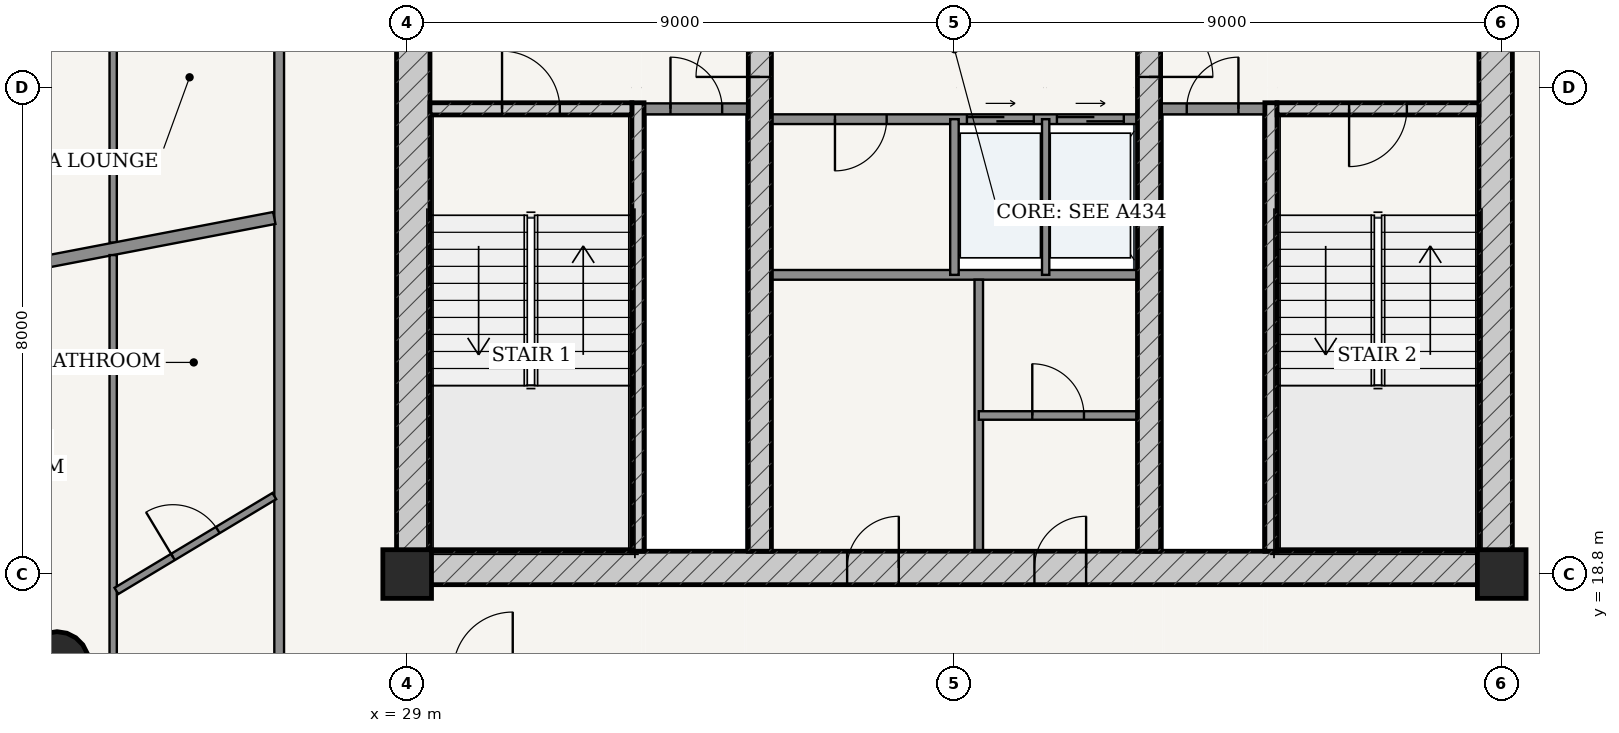
"""IFC4 building model, lengths in metres.
Left out: names, types, materials, properties, quantities, classifications, styles, units other than length and angle.
Written with IfcOpenShell. Run it as: python <this file> out.ifc"""

import sys

from ifc_helpers import new_model, si_unit, direction, frame, frame_2d, origin, origin_2d, place, context, subcontext, project, spatial, rectangle, hollow_circle, extrude, source, transform, mapped, element, fill, save


model = new_model("IFC4")
c1 = context("Model", 3, precision=1e-05, world=origin(), true_north=direction((-0.2419218956, 0.970295726276)))
c2 = subcontext(c1, "Body", "Model", "MODEL_VIEW")
j1 = project(units=[si_unit("LENGTHUNIT", "METRE"), si_unit("PLANEANGLEUNIT", "RADIAN")], contexts=[c1])
p1 = place(None, origin())
s1 = spatial("IfcSite", under=j1, at=p1, CompositionType="ELEMENT")
p2 = place(p1, origin())
s2 = spatial("IfcBuilding", under=s1, at=p2, CompositionType="ELEMENT")
p3 = place(p2, frame((0.0, 0.0, 255.7)))
s3 = spatial("IfcBuildingStorey", under=s2, at=p3, CompositionType="ELEMENT", Elevation=255.7)
for number, where, z_axis, x_axis in (
    (1, (29.0, 18.8, 0.0), (0.0, 0.0, 1.0), (1.0, 0.0, 0.0)),
    (2, (47.0, 18.8, 0.0), (0.0, 0.0, 1.0), (1.0, 0.0, 0.0)),
):
    element("IfcColumn", number, at=place(p3, frame(where, z_axis=z_axis, x_axis=x_axis)), inside=s3, PredefinedType="COLUMN", context=c2, shape_type="SweptSolid", body=[
        extrude(rectangle(XDim=0.8, YDim=0.8, at=origin_2d()), origin(), (0.0, 0.0, 1.0), 3.75),
    ])
p4 = place(p3, frame((28.825, 18.9, 0.0), z_axis=(0.0, 0.0, 1.0), x_axis=(1.0, 0.0, 0.0)))
e3 = element("IfcWall", 3, at=p4, inside=s3, PredefinedType="SHEAR", context=c2, shape_type="SweptSolid", body=[
    extrude(rectangle(XDim=18.35, YDim=0.55, at=frame_2d((9.175, 0.0))), origin(), (0.0, 0.0, 1.0), 3.49),
])
p5 = place(p4, frame((7.41, 0.0, 0.0)))
e4 = element("IfcOpeningElement", 4, at=p5, cuts=e3, PredefinedType="OPENING", context=c2, shape_type="SweptSolid", body=[
    extrude(rectangle(XDim=0.85, YDim=2.1, at=frame_2d((0.425, 1.05))), frame((0.0, 0.285, 0.0), z_axis=(0.0, -1.0, 0.0), x_axis=(1.0, 0.0, 0.0)), (0.0, 0.0, 1.0), 0.57),
])
p6 = place(p4, frame((10.49, 0.0, 0.0)))
e5 = element("IfcOpeningElement", 5, at=p6, cuts=e3, PredefinedType="OPENING", context=c2, shape_type="SweptSolid", body=[
    extrude(rectangle(XDim=0.85, YDim=2.1, at=frame_2d((0.425, 1.05))), frame((0.0, 0.285, 0.0), z_axis=(0.0, -1.0, 0.0), x_axis=(1.0, 0.0, 0.0)), (0.0, 0.0, 1.0), 0.57),
])
p7 = place(p3, frame((29.1, 19.175, 0.0), z_axis=(0.0, 0.0, 1.0), x_axis=(0.0, 1.0, 0.0)))
e6 = element("IfcWall", 6, at=p7, inside=s3, PredefinedType="SHEAR", context=c2, shape_type="SweptSolid", body=[
    extrude(rectangle(XDim=15.25, YDim=0.55, at=frame_2d((7.625, 0.0))), origin(), (0.0, 0.0, 1.0), 3.49),
])
p8 = place(p7, frame((9.875, 0.0, 0.0)))
e7 = element("IfcOpeningElement", 7, at=p8, cuts=e6, PredefinedType="OPENING", context=c2, shape_type="SweptSolid", body=[
    extrude(rectangle(XDim=1.5, YDim=2.2, at=frame_2d((0.75, 1.1))), frame((0.0, 0.285, 0.0), z_axis=(0.0, -1.0, 0.0), x_axis=(1.0, 0.0, 0.0)), (0.0, 0.0, 1.0), 0.57),
])
p9 = place(p3, frame((46.9, 19.175, 0.0), z_axis=(0.0, 0.0, 1.0), x_axis=(0.0, 1.0, 0.0)))
e8 = element("IfcWall", 8, at=p9, inside=s3, PredefinedType="SHEAR", context=c2, shape_type="SweptSolid", body=[
    extrude(rectangle(XDim=15.25, YDim=0.55, at=frame_2d((7.625, 0.0))), origin(), (0.0, 0.0, 1.0), 3.49),
])
p10 = place(p9, frame((9.875, 0.0, 0.0)))
e9 = element("IfcOpeningElement", 9, at=p10, cuts=e8, PredefinedType="OPENING", context=c2, shape_type="SweptSolid", body=[
    extrude(rectangle(XDim=1.5, YDim=2.2, at=frame_2d((0.75, 1.1))), frame((0.0, 0.285, 0.0), z_axis=(0.0, -1.0, 0.0), x_axis=(1.0, 0.0, 0.0)), (0.0, 0.0, 1.0), 0.57),
])
p11 = place(p3, frame((32.795, 19.175, 0.0), z_axis=(0.0, 0.0, 1.0), x_axis=(0.0, 1.0, 0.0)))
e10 = element("IfcWall", 10, at=p11, inside=s3, PredefinedType="SOLIDWALL", context=c2, shape_type="SweptSolid", body=[
    extrude(rectangle(XDim=7.375, YDim=0.2, at=frame_2d((3.688, 0.0))), origin(), (0.0, 0.0, 1.0), 3.49),
])
p12 = place(p3, frame((29.375, 26.45, 0.0), z_axis=(0.0, 0.0, 1.0), x_axis=(1.0, 0.0, 0.0)))
e11 = element("IfcWall", 11, at=p12, inside=s3, PredefinedType="SOLIDWALL", context=c2, shape_type="SweptSolid", body=[
    extrude(rectangle(XDim=3.32, YDim=0.2, at=frame_2d((1.66, 0.0))), origin(), (0.0, 0.0, 1.0), 3.49),
])
p13 = place(p12, frame((1.185, 0.0, 0.0)))
e12 = element("IfcOpeningElement", 12, at=p13, cuts=e11, PredefinedType="OPENING", context=c2, shape_type="SweptSolid", body=[
    extrude(rectangle(XDim=0.95, YDim=2.15, at=frame_2d((0.475, 1.075))), frame((0.0, 0.11, 0.0), z_axis=(0.0, -1.0, 0.0), x_axis=(1.0, 0.0, 0.0)), (0.0, 0.0, 1.0), 0.22),
])
p14 = place(p3, frame((43.205, 19.175, 0.0), z_axis=(0.0, 0.0, 1.0), x_axis=(0.0, 1.0, 0.0)))
e13 = element("IfcWall", 13, at=p14, inside=s3, PredefinedType="SOLIDWALL", context=c2, shape_type="SweptSolid", body=[
    extrude(rectangle(XDim=7.375, YDim=0.2, at=frame_2d((3.688, 0.0))), origin(), (0.0, 0.0, 1.0), 3.49),
])
p15 = place(p3, frame((43.305, 26.45, 0.0), z_axis=(0.0, 0.0, 1.0), x_axis=(1.0, 0.0, 0.0)))
e14 = element("IfcWall", 14, at=p15, inside=s3, PredefinedType="SOLIDWALL", context=c2, shape_type="SweptSolid", body=[
    extrude(rectangle(XDim=3.32, YDim=0.2, at=frame_2d((1.66, 0.0))), origin(), (0.0, 0.0, 1.0), 3.49),
])
p16 = place(p15, frame((1.185, 0.0, 0.0)))
e15 = element("IfcOpeningElement", 15, at=p16, cuts=e14, PredefinedType="OPENING", context=c2, shape_type="SweptSolid", body=[
    extrude(rectangle(XDim=0.95, YDim=2.15, at=frame_2d((0.475, 1.075))), frame((0.0, 0.11, 0.0), z_axis=(0.0, -1.0, 0.0), x_axis=(1.0, 0.0, 0.0)), (0.0, 0.0, 1.0), 0.22),
])
p17 = place(p3, frame((34.8, 19.175, 0.0), z_axis=(0.0, 0.0, 1.0), x_axis=(0.0, 1.0, 0.0)))
e16 = element("IfcWall", 16, at=p17, inside=s3, PredefinedType="SHEAR", context=c2, shape_type="SweptSolid", body=[
    extrude(rectangle(XDim=15.25, YDim=0.38, at=frame_2d((7.625, 0.0))), origin(), (0.0, 0.0, 1.0), 3.49),
])
p18 = place(p17, frame((7.8, 0.0, 0.0)))
e17 = element("IfcOpeningElement", 17, at=p18, cuts=e16, PredefinedType="OPENING", context=c2, shape_type="SweptSolid", body=[
    extrude(rectangle(XDim=1.05, YDim=2.15, at=frame_2d((0.525, 1.075))), frame((0.0, 0.2, 0.0), z_axis=(0.0, -1.0, 0.0), x_axis=(1.0, 0.0, 0.0)), (0.0, 0.0, 1.0), 0.4),
])
p19 = place(p3, frame((41.2, 19.175, 0.0), z_axis=(0.0, 0.0, 1.0), x_axis=(0.0, 1.0, 0.0)))
e18 = element("IfcWall", 18, at=p19, inside=s3, PredefinedType="SHEAR", context=c2, shape_type="SweptSolid", body=[
    extrude(rectangle(XDim=15.25, YDim=0.38, at=frame_2d((7.625, 0.0))), origin(), (0.0, 0.0, 1.0), 3.49),
])
p20 = place(p19, frame((7.8, 0.0, 0.0)))
e19 = element("IfcOpeningElement", 19, at=p20, cuts=e18, PredefinedType="OPENING", context=c2, shape_type="SweptSolid", body=[
    extrude(rectangle(XDim=1.05, YDim=2.15, at=frame_2d((0.525, 1.075))), frame((0.0, 0.2, 0.0), z_axis=(0.0, -1.0, 0.0), x_axis=(1.0, 0.0, 0.0)), (0.0, 0.0, 1.0), 0.4),
])
p21 = place(p3, frame((23.241, 17.328, 0.0), z_axis=(0.0, 0.0, 1.0), x_axis=(1.0, 0.0, 0.0)))
e20 = element("IfcColumn", 20, at=p21, inside=s3, PredefinedType="COLUMN", context=c2, shape_type="SweptSolid", body=[
    extrude(hollow_circle(Radius=0.525, WallThickness=0.035, at=origin_2d()), origin(), (0.0, 0.0, 1.0), 3.75),
])
p22 = place(p3, frame((32.9, 26.45, 0.0), z_axis=(0.0, 0.0, 1.0), x_axis=(1.0, 0.0, 0.0)))
e21 = element("IfcWall", 21, at=p22, inside=s3, PredefinedType="PARTITIONING", context=c2, shape_type="SweptSolid", body=[
    extrude(rectangle(XDim=1.71, YDim=0.18, at=frame_2d((0.855, 0.0))), origin(), (0.0, 0.0, 1.0), 3.49),
])
p23 = place(p22, frame((0.43, 0.0, 0.0)))
e22 = element("IfcOpeningElement", 22, at=p23, cuts=e21, PredefinedType="OPENING", context=c2, shape_type="SweptSolid", body=[
    extrude(rectangle(XDim=0.85, YDim=2.1, at=frame_2d((0.425, 1.05))), frame((0.0, 0.1, 0.0), z_axis=(0.0, -1.0, 0.0), x_axis=(1.0, 0.0, 0.0)), (0.0, 0.0, 1.0), 0.2),
])
p24 = place(p3, frame((41.39, 26.45, 0.0), z_axis=(0.0, 0.0, 1.0), x_axis=(1.0, 0.0, 0.0)))
e23 = element("IfcWall", 23, at=p24, inside=s3, PredefinedType="PARTITIONING", context=c2, shape_type="SweptSolid", body=[
    extrude(rectangle(XDim=1.71, YDim=0.18, at=frame_2d((0.855, 0.0))), origin(), (0.0, 0.0, 1.0), 3.49),
])
p25 = place(p24, frame((0.43, 0.0, 0.0)))
e24 = element("IfcOpeningElement", 24, at=p25, cuts=e23, PredefinedType="OPENING", context=c2, shape_type="SweptSolid", body=[
    extrude(rectangle(XDim=0.85, YDim=2.1, at=frame_2d((0.425, 1.05))), frame((0.0, 0.1, 0.0), z_axis=(0.0, -1.0, 0.0), x_axis=(1.0, 0.0, 0.0)), (0.0, 0.0, 1.0), 0.2),
])
p26 = place(p3, frame((34.99, 26.28, 0.0), z_axis=(0.0, 0.0, 1.0), x_axis=(1.0, 0.0, 0.0)))
e25 = element("IfcWall", 25, at=p26, inside=s3, PredefinedType="PARTITIONING", context=c2, shape_type="SweptSolid", body=[
    extrude(rectangle(XDim=6.02, YDim=0.16, at=frame_2d((3.01, 0.0))), origin(), (0.0, 0.0, 1.0), 3.49),
])
p27 = place(p26, frame((1.045, 0.0, 0.0)))
e26 = element("IfcOpeningElement", 26, at=p27, cuts=e25, PredefinedType="OPENING", context=c2, shape_type="SweptSolid", body=[
    extrude(rectangle(XDim=0.85, YDim=2.1, at=frame_2d((0.425, 1.05))), frame((0.0, 0.09, 0.0), z_axis=(0.0, -1.0, 0.0), x_axis=(1.0, 0.0, 0.0)), (0.0, 0.0, 1.0), 0.18),
])
p28 = place(p26, frame((3.215, 0.0, 0.0)))
e27 = element("IfcOpeningElement", 27, at=p28, cuts=e25, PredefinedType="OPENING", context=c2, shape_type="SweptSolid", body=[
    extrude(rectangle(XDim=1.1, YDim=2.2, at=frame_2d((0.55, 1.1))), frame((0.0, 0.09, 0.0), z_axis=(0.0, -1.0, 0.0), x_axis=(1.0, 0.0, 0.0)), (0.0, 0.0, 1.0), 0.18),
])
p29 = place(p26, frame((4.695, 0.0, 0.0)))
e28 = element("IfcOpeningElement", 28, at=p29, cuts=e25, PredefinedType="OPENING", context=c2, shape_type="SweptSolid", body=[
    extrude(rectangle(XDim=1.1, YDim=2.2, at=frame_2d((0.55, 1.1))), frame((0.0, 0.09, 0.0), z_axis=(0.0, -1.0, 0.0), x_axis=(1.0, 0.0, 0.0)), (0.0, 0.0, 1.0), 0.18),
])
p30 = place(p3, frame((34.99, 23.72, 0.0), z_axis=(0.0, 0.0, 1.0), x_axis=(1.0, 0.0, 0.0)))
e29 = element("IfcWall", 29, at=p30, inside=s3, PredefinedType="PARTITIONING", context=c2, shape_type="SweptSolid", body=[
    extrude(rectangle(XDim=6.02, YDim=0.16, at=frame_2d((3.01, 0.0))), origin(), (0.0, 0.0, 1.0), 3.49),
])
p31 = place(p3, frame((38.0, 23.72, 0.0), z_axis=(0.0, 0.0, 1.0), x_axis=(0.0, 1.0, 0.0)))
e30 = element("IfcWall", 30, at=p31, inside=s3, PredefinedType="PARTITIONING", context=c2, shape_type="SweptSolid", body=[
    extrude(rectangle(XDim=2.56, YDim=0.14, at=frame_2d((1.28, 0.0))), origin(), (0.0, 0.0, 1.0), 3.49),
])
p32 = place(p3, frame((39.5, 23.72, 0.0), z_axis=(0.0, 0.0, 1.0), x_axis=(0.0, 1.0, 0.0)))
e31 = element("IfcWall", 31, at=p32, inside=s3, PredefinedType="PARTITIONING", context=c2, shape_type="SweptSolid", body=[
    extrude(rectangle(XDim=2.56, YDim=0.12, at=frame_2d((1.28, 0.0))), origin(), (0.0, 0.0, 1.0), 3.49),
])
p33 = place(p3, frame((38.4, 19.175, 0.0), z_axis=(0.0, 0.0, 1.0), x_axis=(0.0, 1.0, 0.0)))
e32 = element("IfcWall", 32, at=p33, inside=s3, PredefinedType="PARTITIONING", context=c2, shape_type="SweptSolid", body=[
    extrude(rectangle(XDim=4.465, YDim=0.14, at=frame_2d((2.232, 0.0))), origin(), (0.0, 0.0, 1.0), 3.49),
])
p34 = place(p3, frame((38.4, 21.407, 0.0), z_axis=(0.0, 0.0, 1.0), x_axis=(1.0, 0.0, 0.0)))
e33 = element("IfcWall", 33, at=p34, inside=s3, PredefinedType="PARTITIONING", context=c2, shape_type="SweptSolid", body=[
    extrude(rectangle(XDim=2.61, YDim=0.14, at=frame_2d((1.305, 0.0))), origin(), (0.0, 0.0, 1.0), 3.49),
])
p35 = place(p34, frame((0.88, 0.0, 0.0)))
e34 = element("IfcOpeningElement", 34, at=p35, cuts=e33, PredefinedType="OPENING", context=c2, shape_type="SweptSolid", body=[
    extrude(rectangle(XDim=0.85, YDim=2.1, at=frame_2d((0.425, 1.05))), frame((0.0, 0.08, 0.0), z_axis=(0.0, -1.0, 0.0), x_axis=(1.0, 0.0, 0.0)), (0.0, 0.0, 1.0), 0.16),
])
p36 = place(p3, frame((26.895, 17.275, 0.0), z_axis=(0.0, 0.0, 1.0), x_axis=(0.0, 1.0, 0.0)))
e35 = element("IfcWall", 35, at=p36, inside=s3, PredefinedType="PARTITIONING", context=c2, shape_type="SweptSolid", body=[
    extrude(rectangle(XDim=13.925, YDim=0.16, at=frame_2d((6.962, 0.0))), origin(), (0.0, 0.0, 1.0), 3.015),
])
p37 = place(p3, frame((24.165, 24.249, 0.0), z_axis=(0.0, 0.0, 1.0), x_axis=(0.0, 1.0, 0.0)))
e36 = element("IfcWall", 36, at=p37, inside=s3, PredefinedType="PARTITIONING", context=c2, shape_type="SweptSolid", body=[
    extrude(rectangle(XDim=9.761, YDim=0.12, at=frame_2d((4.88, 0.0))), origin(), (0.0, 0.0, 1.0), 3.015),
])
p38 = place(p37, frame((4.43, 0.0, 0.0)))
e37 = element("IfcOpeningElement", 37, at=p38, cuts=e36, PredefinedType="OPENING", context=c2, shape_type="SweptSolid", body=[
    extrude(rectangle(XDim=0.9, YDim=2.15, at=frame_2d((0.45, 1.075))), frame((0.0, 0.07, 0.0), z_axis=(0.0, -1.0, 0.0), x_axis=(1.0, 0.0, 0.0)), (0.0, 0.0, 1.0), 0.14),
])
p39 = place(p3, frame((26.815, 24.656, 0.0), z_axis=(0.0, 0.0, 1.0), x_axis=(-0.982109889803, -0.188308694305, 0.0)))
e38 = element("IfcWall", 38, at=p39, inside=s3, PredefinedType="PARTITIONING", context=c2, shape_type="SweptSolid", body=[
    extrude(rectangle(XDim=7.884, YDim=0.2, at=frame_2d((3.942, 0.0))), origin(), (0.0, 0.0, 1.0), 3.015),
])
p40 = place(p3, frame((24.165, 14.465, 0.0), z_axis=(0.0, 0.0, 1.0), x_axis=(0.0, 1.0, 0.0)))
e39 = element("IfcWall", 39, at=p40, inside=s3, PredefinedType="PARTITIONING", context=c2, shape_type="SweptSolid", body=[
    extrude(rectangle(XDim=9.58, YDim=0.12, at=frame_2d((4.79, 0.0))), origin(), (0.0, 0.0, 1.0), 3.015),
])
p41 = place(p40, frame((0.879, 0.0, 0.0)))
e40 = element("IfcOpeningElement", 40, at=p41, cuts=e39, PredefinedType="OPENING", context=c2, shape_type="SweptSolid", body=[
    extrude(rectangle(XDim=0.9, YDim=2.15, at=frame_2d((0.45, 1.075))), frame((0.0, 0.07, 0.0), z_axis=(0.0, -1.0, 0.0), x_axis=(1.0, 0.0, 0.0)), (0.0, 0.0, 1.0), 0.14),
])
p42 = place(p3, frame((26.815, 20.082, 0.0), z_axis=(0.0, 0.0, 1.0), x_axis=(-0.857265264382, -0.514875000834, 0.0)))
e41 = element("IfcWall", 41, at=p42, inside=s3, PredefinedType="PARTITIONING", context=c2, shape_type="SweptSolid", body=[
    extrude(rectangle(XDim=3.029, YDim=0.12, at=frame_2d((1.515, 0.0))), origin(), (0.0, 0.0, 1.0), 3.209),
])
p43 = place(p42, frame((1.085, 0.0, 0.0)))
e42 = element("IfcOpeningElement", 42, at=p43, cuts=e41, PredefinedType="OPENING", context=c2, shape_type="SweptSolid", body=[
    extrude(rectangle(XDim=0.86, YDim=2.15, at=frame_2d((0.43, 1.075))), frame((0.0, 0.07, 0.0), z_axis=(0.0, -1.0, 0.0), x_axis=(1.0, 0.0, 0.0)), (0.0, 0.0, 1.0), 0.14),
])
m1 = source(origin(), c2, "Body", "SweptSolid", [
    extrude(rectangle(XDim=1.05, YDim=2.15, at=frame_2d((0.525, 1.075))), frame((0.0, 0.025, 0.0), z_axis=(0.0, -1.0, 0.0), x_axis=(1.0, 0.0, 0.0)), (0.0, 0.0, 1.0), 0.05),
])
p44 = place(p18, origin())
e43 = element("IfcDoor", 43, at=p44, inside=s3, OperationType="SINGLE_SWING_LEFT", PredefinedType="DOOR", context=c2, shape_type="MappedRepresentation", body=[
    mapped(m1, transform((0.0, 0.0, 0.0), scale=1.0)),
])
fill(e17, e43)
p45 = place(p20, frame((1.05, 0.0, 0.0), z_axis=(0.0, 0.0, 1.0), x_axis=(-1.0, 0.0, 0.0)))
e44 = element("IfcDoor", 44, at=p45, inside=s3, OperationType="SINGLE_SWING_RIGHT", PredefinedType="DOOR", context=c2, shape_type="MappedRepresentation", body=[
    mapped(m1, transform((0.0, 0.0, 0.0), scale=1.0)),
])
fill(e19, e44)
m2 = source(origin(), c2, "Body", "SweptSolid", [
    extrude(rectangle(XDim=0.95, YDim=2.15, at=frame_2d((0.475, 1.075))), frame((0.0, 0.025, 0.0), z_axis=(0.0, -1.0, 0.0), x_axis=(1.0, 0.0, 0.0)), (0.0, 0.0, 1.0), 0.05),
])
p46 = place(p13, origin())
e45 = element("IfcDoor", 45, at=p46, inside=s3, OperationType="SINGLE_SWING_LEFT", PredefinedType="DOOR", context=c2, shape_type="MappedRepresentation", body=[
    mapped(m2, transform((0.0, 0.0, 0.0), scale=1.0)),
])
fill(e12, e45)
p47 = place(p16, frame((0.95, 0.0, 0.0), z_axis=(0.0, 0.0, 1.0), x_axis=(-1.0, 0.0, 0.0)))
e46 = element("IfcDoor", 46, at=p47, inside=s3, OperationType="SINGLE_SWING_RIGHT", PredefinedType="DOOR", context=c2, shape_type="MappedRepresentation", body=[
    mapped(m2, transform((0.0, 0.0, 0.0), scale=1.0)),
])
fill(e15, e46)
m3 = source(origin(), c2, "Body", "SweptSolid", [
    extrude(rectangle(XDim=0.85, YDim=2.1, at=frame_2d((0.425, 1.05))), frame((0.0, 0.025, 0.0), z_axis=(0.0, -1.0, 0.0), x_axis=(1.0, 0.0, 0.0)), (0.0, 0.0, 1.0), 0.05),
])
p48 = place(p23, origin())
e47 = element("IfcDoor", 47, at=p48, inside=s3, OperationType="SINGLE_SWING_LEFT", PredefinedType="DOOR", context=c2, shape_type="MappedRepresentation", body=[
    mapped(m3, transform((0.0, 0.0, 0.0), scale=1.0)),
])
fill(e22, e47)
p49 = place(p25, origin())
e48 = element("IfcDoor", 48, at=p49, inside=s3, OperationType="SINGLE_SWING_RIGHT", PredefinedType="DOOR", context=c2, shape_type="MappedRepresentation", body=[
    mapped(m3, transform((0.0, 0.0, 0.0), scale=1.0)),
])
fill(e24, e48)
p50 = place(p27, frame((0.85, 0.0, 0.0), z_axis=(0.0, 0.0, 1.0), x_axis=(-1.0, 0.0, 0.0)))
e49 = element("IfcDoor", 49, at=p50, inside=s3, OperationType="SINGLE_SWING_RIGHT", PredefinedType="DOOR", context=c2, shape_type="MappedRepresentation", body=[
    mapped(m3, transform((0.0, 0.0, 0.0), scale=1.0)),
])
fill(e26, e49)
p51 = place(p5, origin())
e50 = element("IfcDoor", 50, at=p51, inside=s3, OperationType="SINGLE_SWING_RIGHT", PredefinedType="DOOR", context=c2, shape_type="MappedRepresentation", body=[
    mapped(m3, transform((0.0, 0.0, 0.0), scale=1.0)),
])
fill(e4, e50)
p52 = place(p6, origin())
e51 = element("IfcDoor", 51, at=p52, inside=s3, OperationType="SINGLE_SWING_RIGHT", PredefinedType="DOOR", context=c2, shape_type="MappedRepresentation", body=[
    mapped(m3, transform((0.0, 0.0, 0.0), scale=1.0)),
])
fill(e5, e51)
p53 = place(p35, origin())
e52 = element("IfcDoor", 52, at=p53, inside=s3, OperationType="SINGLE_SWING_LEFT", PredefinedType="DOOR", context=c2, shape_type="MappedRepresentation", body=[
    mapped(m3, transform((0.0, 0.0, 0.0), scale=1.0)),
])
fill(e34, e52)
m4 = source(origin(), c2, "Body", "SweptSolid", [
    extrude(rectangle(XDim=1.1, YDim=2.2, at=frame_2d((0.55, 1.1))), frame((0.0, 0.025, 0.0), z_axis=(0.0, -1.0, 0.0), x_axis=(1.0, 0.0, 0.0)), (0.0, 0.0, 1.0), 0.05),
])
p54 = place(p28, origin())
e53 = element("IfcDoor", 53, at=p54, inside=s3, OperationType="DOUBLE_DOOR_SLIDING", PredefinedType="DOOR", context=c2, shape_type="MappedRepresentation", body=[
    mapped(m4, transform((0.0, 0.0, 0.0), scale=1.0)),
])
fill(e27, e53)
p55 = place(p29, origin())
e54 = element("IfcDoor", 54, at=p55, inside=s3, OperationType="DOUBLE_DOOR_SLIDING", PredefinedType="DOOR", context=c2, shape_type="MappedRepresentation", body=[
    mapped(m4, transform((0.0, 0.0, 0.0), scale=1.0)),
])
fill(e28, e54)
m5 = source(origin(), c2, "Body", "SweptSolid", [
    extrude(rectangle(XDim=0.86, YDim=2.15, at=frame_2d((0.43, 1.075))), frame((0.0, 0.025, 0.0), z_axis=(0.0, -1.0, 0.0), x_axis=(1.0, 0.0, 0.0)), (0.0, 0.0, 1.0), 0.05),
])
p56 = place(p43, frame((0.86, 0.0, 0.0), z_axis=(0.0, 0.0, 1.0), x_axis=(-1.0, 0.0, 0.0)))
e55 = element("IfcDoor", 55, at=p56, inside=s3, OperationType="SINGLE_SWING_LEFT", PredefinedType="DOOR", context=c2, shape_type="MappedRepresentation", body=[
    mapped(m5, transform((0.0, 0.0, 0.0), scale=1.0)),
])
fill(e42, e55)
save(model, sys.argv[1])
